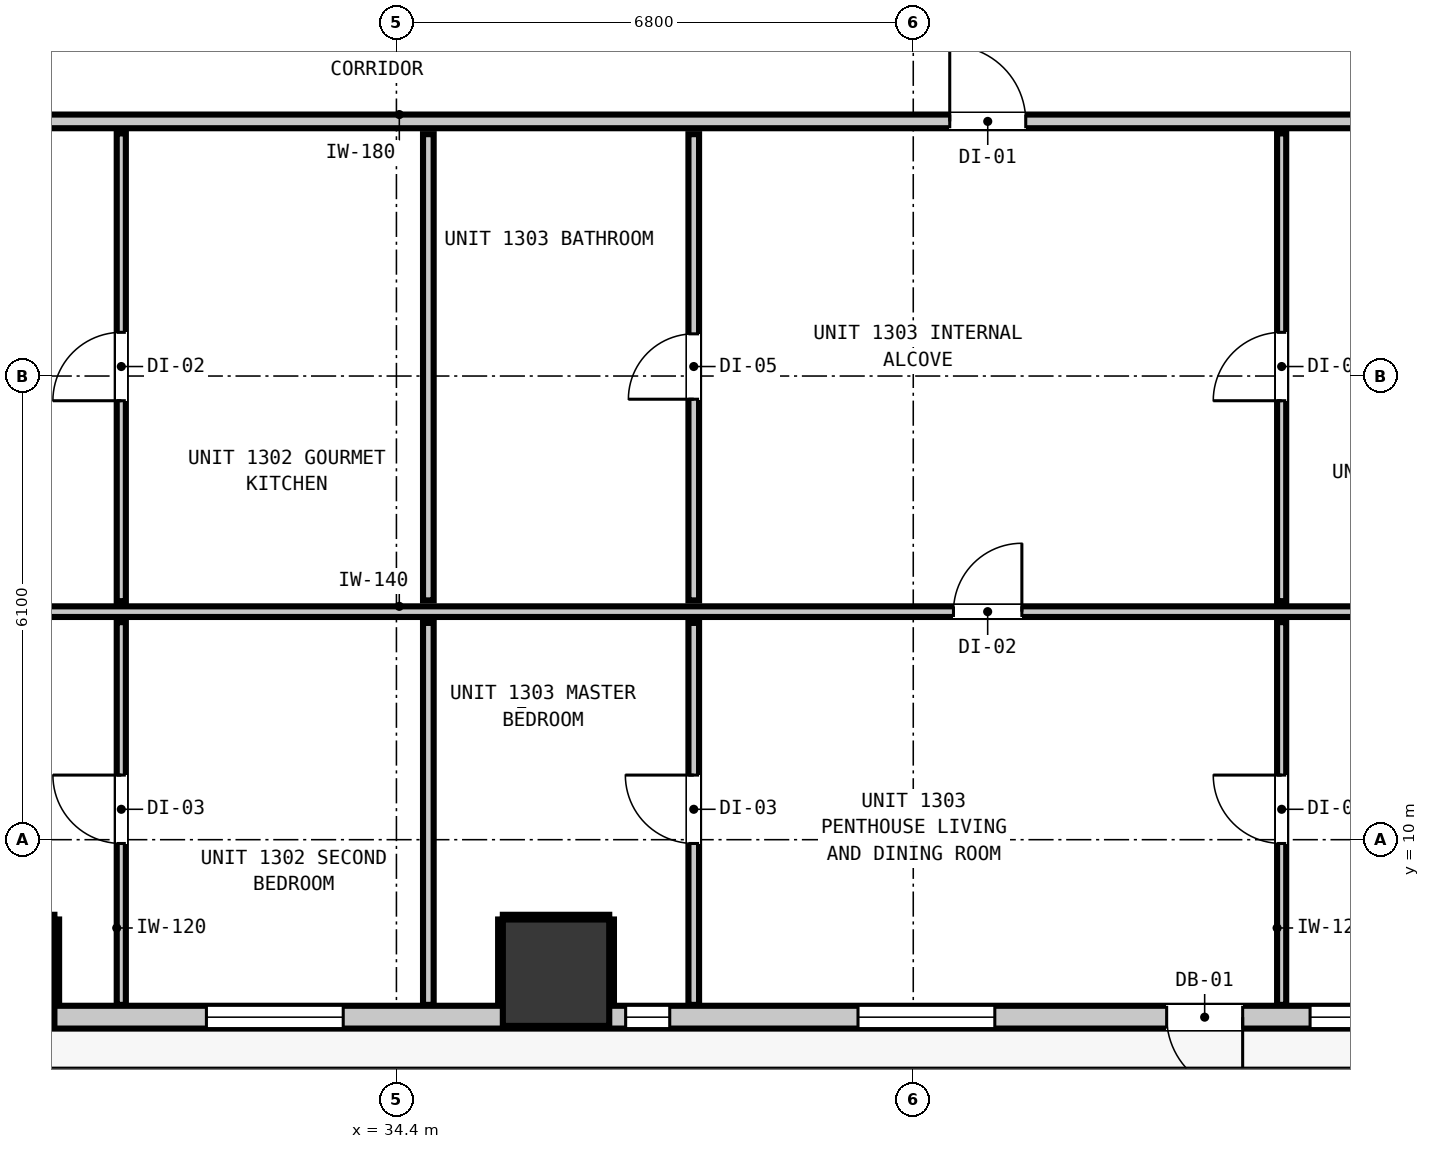
"""IFC4 building model, lengths in metres.
Left out: names, types, materials, properties, quantities, classifications, styles, units other than length and angle.
Written with IfcOpenShell. Run it as: python <this file> out.ifc"""

import sys

from ifc_helpers import new_model, si_unit, direction, frame, frame_2d, origin, origin_2d, place, context, subcontext, project, spatial, rectangle, extrude, element, fill, save


model = new_model("IFC4")
c1 = context("Model", 3, precision=1e-05, world=origin(), true_north=direction((0.0, 1.0)))
c2 = subcontext(c1, "Body", "Model", "MODEL_VIEW")
j1 = project(units=[si_unit("LENGTHUNIT", "METRE"), si_unit("PLANEANGLEUNIT", "RADIAN")], contexts=[c1])
p1 = place(None, origin())
s1 = spatial("IfcSite", under=j1, at=p1, CompositionType="ELEMENT")
p2 = place(p1, origin())
s2 = spatial("IfcBuilding", under=s1, at=p2, CompositionType="ELEMENT")
p3 = place(p2, frame((0.0, 0.0, 48.56)))
s3 = spatial("IfcBuildingStorey", under=s2, at=p3, CompositionType="ELEMENT", Elevation=48.56)
for number, where, z_axis, x_axis in (
    (1, (29.2, 8.25, 0.0), (0.0, 0.0, 1.0), (1.0, 0.0, 0.0)),
    (2, (36.5, 8.25, 0.0), (0.0, 0.0, 1.0), (1.0, 0.0, 0.0)),
):
    element("IfcColumn", number, at=place(p3, frame(where, z_axis=z_axis, x_axis=x_axis)), inside=s3, PredefinedType="COLUMN", context=c2, shape_type="SweptSolid", body=[
        extrude(rectangle(XDim=1.4, YDim=1.4, at=origin_2d()), origin(), (0.0, 0.0, 1.0), 3.32),
    ])
p4 = place(p3, frame((47.835, 7.665, 0.0), z_axis=(0.0, 0.0, 1.0), x_axis=(-1.0, 0.0, 0.0)))
e3 = element("IfcWall", 3, at=p4, inside=s3, PredefinedType="STANDARD", context=c2, shape_type="SweptSolid", body=[
    extrude(rectangle(XDim=37.47, YDim=0.3, at=frame_2d((18.735, 0.0))), origin(), (0.0, 0.0, 1.0), 3.06),
])
p5 = place(p4, frame((2.301, 0.0, 0.0)))
e4 = element("IfcOpeningElement", 4, at=p5, cuts=e3, PredefinedType="OPENING", context=c2, shape_type="SweptSolid", body=[
    extrude(rectangle(XDim=1.0, YDim=2.15, at=frame_2d((0.5, 1.075))), frame((0.0, 0.16, 0.0), z_axis=(0.0, -1.0, 0.0), x_axis=(1.0, 0.0, 0.0)), (0.0, 0.0, 1.0), 0.32),
])
p6 = place(p4, frame((32.251, 0.0, 0.85)))
e5 = element("IfcOpeningElement", 5, at=p6, cuts=e3, PredefinedType="OPENING", context=c2, shape_type="SweptSolid", body=[
    extrude(rectangle(XDim=1.05, YDim=1.65, at=frame_2d((0.525, 0.825))), frame((0.0, 0.16, 0.0), z_axis=(0.0, -1.0, 0.0), x_axis=(1.0, 0.0, 0.0)), (0.0, 0.0, 1.0), 0.32),
])
p7 = place(p4, frame((21.329, 0.0, 0.85)))
e6 = element("IfcOpeningElement", 6, at=p7, cuts=e3, PredefinedType="OPENING", context=c2, shape_type="SweptSolid", body=[
    extrude(rectangle(XDim=1.8, YDim=1.9, at=frame_2d((0.9, 0.95))), frame((0.0, 0.16, 0.0), z_axis=(0.0, -1.0, 0.0), x_axis=(1.0, 0.0, 0.0)), (0.0, 0.0, 1.0), 0.32),
])
p8 = place(p4, frame((25.539, 0.0, 0.85)))
e7 = element("IfcOpeningElement", 7, at=p8, cuts=e3, PredefinedType="OPENING", context=c2, shape_type="SweptSolid", body=[
    extrude(rectangle(XDim=0.58, YDim=1.5, at=frame_2d((0.29, 0.75))), frame((0.0, 0.16, 0.0), z_axis=(0.0, -1.0, 0.0), x_axis=(1.0, 0.0, 0.0)), (0.0, 0.0, 1.0), 0.32),
])
p9 = place(p4, frame((14.135, 0.0, 0.85)))
e8 = element("IfcOpeningElement", 8, at=p9, cuts=e3, PredefinedType="OPENING", context=c2, shape_type="SweptSolid", body=[
    extrude(rectangle(XDim=1.8, YDim=1.9, at=frame_2d((0.9, 0.95))), frame((0.0, 0.16, 0.0), z_axis=(0.0, -1.0, 0.0), x_axis=(1.0, 0.0, 0.0)), (0.0, 0.0, 1.0), 0.32),
])
p10 = place(p4, frame((5.562, 0.0, 0.85)))
e9 = element("IfcOpeningElement", 9, at=p10, cuts=e3, PredefinedType="OPENING", context=c2, shape_type="SweptSolid", body=[
    extrude(rectangle(XDim=1.8, YDim=1.9, at=frame_2d((0.9, 0.95))), frame((0.0, 0.16, 0.0), z_axis=(0.0, -1.0, 0.0), x_axis=(1.0, 0.0, 0.0)), (0.0, 0.0, 1.0), 0.32),
])
p11 = place(p4, frame((9.839, 0.0, 0.85)))
e10 = element("IfcOpeningElement", 10, at=p11, cuts=e3, PredefinedType="OPENING", context=c2, shape_type="SweptSolid", body=[
    extrude(rectangle(XDim=0.58, YDim=1.5, at=frame_2d((0.29, 0.75))), frame((0.0, 0.16, 0.0), z_axis=(0.0, -1.0, 0.0), x_axis=(1.0, 0.0, 0.0)), (0.0, 0.0, 1.0), 0.32),
])
p12 = place(p4, frame((0.364, 0.0, 0.85)))
e11 = element("IfcOpeningElement", 11, at=p12, cuts=e3, PredefinedType="OPENING", context=c2, shape_type="SweptSolid", body=[
    extrude(rectangle(XDim=1.05, YDim=1.65, at=frame_2d((0.525, 0.825))), frame((0.0, 0.16, 0.0), z_axis=(0.0, -1.0, 0.0), x_axis=(1.0, 0.0, 0.0)), (0.0, 0.0, 1.0), 0.32),
])
p13 = place(p3, frame((8.027, 19.45, 0.0), z_axis=(0.0, 0.0, 1.0), x_axis=(1.0, 0.0, 0.0)))
e12 = element("IfcWall", 12, at=p13, inside=s3, PredefinedType="PARTITIONING", context=c2, shape_type="SweptSolid", body=[
    extrude(rectangle(XDim=42.146, YDim=0.18, at=frame_2d((21.073, 0.0))), origin(), (0.0, 0.0, 1.0), 3.06),
])
p14 = place(p13, frame((5.256, 0.0, 0.0)))
e13 = element("IfcOpeningElement", 13, at=p14, cuts=e12, PredefinedType="OPENING", context=c2, shape_type="SweptSolid", body=[
    extrude(rectangle(XDim=1.0, YDim=2.15, at=frame_2d((0.5, 1.075))), frame((0.0, 0.1, 0.0), z_axis=(0.0, -1.0, 0.0), x_axis=(1.0, 0.0, 0.0)), (0.0, 0.0, 1.0), 0.2),
])
p15 = place(p13, frame((18.169, 0.0, 0.0)))
e14 = element("IfcOpeningElement", 14, at=p15, cuts=e12, PredefinedType="OPENING", context=c2, shape_type="SweptSolid", body=[
    extrude(rectangle(XDim=1.0, YDim=2.15, at=frame_2d((0.5, 1.075))), frame((0.0, 0.1, 0.0), z_axis=(0.0, -1.0, 0.0), x_axis=(1.0, 0.0, 0.0)), (0.0, 0.0, 1.0), 0.2),
])
p16 = place(p13, frame((33.653, 0.0, 0.0)))
e15 = element("IfcOpeningElement", 15, at=p16, cuts=e12, PredefinedType="OPENING", context=c2, shape_type="SweptSolid", body=[
    extrude(rectangle(XDim=1.0, YDim=2.15, at=frame_2d((0.5, 1.075))), frame((0.0, 0.1, 0.0), z_axis=(0.0, -1.0, 0.0), x_axis=(1.0, 0.0, 0.0)), (0.0, 0.0, 1.0), 0.2),
])
p17 = place(p3, frame((19.12, 13.0, 0.0), z_axis=(0.0, 0.0, 1.0), x_axis=(1.0, 0.0, 0.0)))
e16 = element("IfcWall", 16, at=p17, inside=s3, PredefinedType="PARTITIONING", context=c2, shape_type="SweptSolid", body=[
    extrude(rectangle(XDim=31.053, YDim=0.14, at=frame_2d((15.526, 0.0))), origin(), (0.0, 0.0, 1.0), 3.06),
])
p18 = place(p17, frame((7.126, 0.0, 0.0)))
e17 = element("IfcOpeningElement", 17, at=p18, cuts=e16, PredefinedType="OPENING", context=c2, shape_type="SweptSolid", body=[
    extrude(rectangle(XDim=0.9, YDim=2.1, at=frame_2d((0.45, 1.05))), frame((0.0, 0.08, 0.0), z_axis=(0.0, -1.0, 0.0), x_axis=(1.0, 0.0, 0.0)), (0.0, 0.0, 1.0), 0.16),
])
p19 = place(p17, frame((22.609, 0.0, 0.0)))
e18 = element("IfcOpeningElement", 18, at=p19, cuts=e16, PredefinedType="OPENING", context=c2, shape_type="SweptSolid", body=[
    extrude(rectangle(XDim=0.9, YDim=2.1, at=frame_2d((0.45, 1.05))), frame((0.0, 0.08, 0.0), z_axis=(0.0, -1.0, 0.0), x_axis=(1.0, 0.0, 0.0)), (0.0, 0.0, 1.0), 0.16),
])
p20 = place(p3, frame((34.82, 7.827, 0.0), z_axis=(0.0, 0.0, 1.0), x_axis=(0.0, 1.0, 0.0)))
e19 = element("IfcWall", 19, at=p20, inside=s3, PredefinedType="PARTITIONING", context=c2, shape_type="SweptSolid", body=[
    extrude(rectangle(XDim=5.025, YDim=0.14, at=frame_2d((2.513, 0.0))), origin(), (0.0, 0.0, 1.0), 3.06),
])
p21 = place(p3, frame((34.82, 13.148, 0.0), z_axis=(0.0, 0.0, 1.0), x_axis=(0.0, 1.0, 0.0)))
e20 = element("IfcWall", 20, at=p21, inside=s3, PredefinedType="PARTITIONING", context=c2, shape_type="SweptSolid", body=[
    extrude(rectangle(XDim=6.134, YDim=0.14, at=frame_2d((3.067, 0.0))), origin(), (0.0, 0.0, 1.0), 3.06),
])
p22 = place(p3, frame((38.312, 7.827, 0.0), z_axis=(0.0, 0.0, 1.0), x_axis=(0.0, 1.0, 0.0)))
e21 = element("IfcWall", 21, at=p22, inside=s3, PredefinedType="PARTITIONING", context=c2, shape_type="SweptSolid", body=[
    extrude(rectangle(XDim=5.025, YDim=0.14, at=frame_2d((2.513, 0.0))), origin(), (0.0, 0.0, 1.0), 3.06),
])
p23 = place(p22, frame((2.123, 0.0, 0.0)))
e22 = element("IfcOpeningElement", 22, at=p23, cuts=e21, PredefinedType="OPENING", context=c2, shape_type="SweptSolid", body=[
    extrude(rectangle(XDim=0.9, YDim=2.1, at=frame_2d((0.45, 1.05))), frame((0.0, 0.08, 0.0), z_axis=(0.0, -1.0, 0.0), x_axis=(1.0, 0.0, 0.0)), (0.0, 0.0, 1.0), 0.16),
])
p24 = place(p3, frame((38.312, 13.148, 0.0), z_axis=(0.0, 0.0, 1.0), x_axis=(0.0, 1.0, 0.0)))
e23 = element("IfcWall", 23, at=p24, inside=s3, PredefinedType="PARTITIONING", context=c2, shape_type="SweptSolid", body=[
    extrude(rectangle(XDim=6.134, YDim=0.14, at=frame_2d((3.067, 0.0))), origin(), (0.0, 0.0, 1.0), 3.06),
])
p25 = place(p24, frame((2.647, 0.0, 0.0)))
e24 = element("IfcOpeningElement", 24, at=p25, cuts=e23, PredefinedType="OPENING", context=c2, shape_type="SweptSolid", body=[
    extrude(rectangle(XDim=0.86, YDim=2.02, at=frame_2d((0.43, 1.01))), frame((0.0, 0.08, 0.0), z_axis=(0.0, -1.0, 0.0), x_axis=(1.0, 0.0, 0.0)), (0.0, 0.0, 1.0), 0.16),
])
p26 = place(p3, frame((30.78, 7.827, 0.0), z_axis=(0.0, 0.0, 1.0), x_axis=(0.0, 1.0, 0.0)))
e25 = element("IfcWall", 25, at=p26, inside=s3, PredefinedType="PARTITIONING", context=c2, shape_type="SweptSolid", body=[
    extrude(rectangle(XDim=5.035, YDim=0.12, at=frame_2d((2.518, 0.0))), origin(), (0.0, 0.0, 1.0), 3.06),
])
p27 = place(p26, frame((2.123, 0.0, 0.0)))
e26 = element("IfcOpeningElement", 26, at=p27, cuts=e25, PredefinedType="OPENING", context=c2, shape_type="SweptSolid", body=[
    extrude(rectangle(XDim=0.9, YDim=2.1, at=frame_2d((0.45, 1.05))), frame((0.0, 0.07, 0.0), z_axis=(0.0, -1.0, 0.0), x_axis=(1.0, 0.0, 0.0)), (0.0, 0.0, 1.0), 0.14),
])
p28 = place(p3, frame((30.78, 13.138, 0.0), z_axis=(0.0, 0.0, 1.0), x_axis=(0.0, 1.0, 0.0)))
e27 = element("IfcWall", 27, at=p28, inside=s3, PredefinedType="PARTITIONING", context=c2, shape_type="SweptSolid", body=[
    extrude(rectangle(XDim=6.154, YDim=0.12, at=frame_2d((3.077, 0.0))), origin(), (0.0, 0.0, 1.0), 3.06),
])
p29 = place(p28, frame((2.637, 0.0, 0.0)))
e28 = element("IfcOpeningElement", 28, at=p29, cuts=e27, PredefinedType="OPENING", context=c2, shape_type="SweptSolid", body=[
    extrude(rectangle(XDim=0.9, YDim=2.1, at=frame_2d((0.45, 1.05))), frame((0.0, 0.07, 0.0), z_axis=(0.0, -1.0, 0.0), x_axis=(1.0, 0.0, 0.0)), (0.0, 0.0, 1.0), 0.14),
])
p30 = place(p3, frame((46.047, 7.827, 0.0), z_axis=(0.0, 0.0, 1.0), x_axis=(0.0, 1.0, 0.0)))
e29 = element("IfcWall", 29, at=p30, inside=s3, PredefinedType="PARTITIONING", context=c2, shape_type="SweptSolid", body=[
    extrude(rectangle(XDim=5.035, YDim=0.12, at=frame_2d((2.518, 0.0))), origin(), (0.0, 0.0, 1.0), 3.06),
])
p31 = place(p30, frame((2.123, 0.0, 0.0)))
e30 = element("IfcOpeningElement", 30, at=p31, cuts=e29, PredefinedType="OPENING", context=c2, shape_type="SweptSolid", body=[
    extrude(rectangle(XDim=0.9, YDim=2.1, at=frame_2d((0.45, 1.05))), frame((0.0, 0.07, 0.0), z_axis=(0.0, -1.0, 0.0), x_axis=(1.0, 0.0, 0.0)), (0.0, 0.0, 1.0), 0.14),
])
p32 = place(p3, frame((46.047, 13.138, 0.0), z_axis=(0.0, 0.0, 1.0), x_axis=(0.0, 1.0, 0.0)))
e31 = element("IfcWall", 31, at=p32, inside=s3, PredefinedType="PARTITIONING", context=c2, shape_type="SweptSolid", body=[
    extrude(rectangle(XDim=6.154, YDim=0.12, at=frame_2d((3.077, 0.0))), origin(), (0.0, 0.0, 1.0), 3.06),
])
p33 = place(p32, frame((2.637, 0.0, 0.0)))
e32 = element("IfcOpeningElement", 32, at=p33, cuts=e31, PredefinedType="OPENING", context=c2, shape_type="SweptSolid", body=[
    extrude(rectangle(XDim=0.9, YDim=2.1, at=frame_2d((0.45, 1.05))), frame((0.0, 0.07, 0.0), z_axis=(0.0, -1.0, 0.0), x_axis=(1.0, 0.0, 0.0)), (0.0, 0.0, 1.0), 0.14),
])
p34 = place(p3, frame((28.5, 8.982, 0.0), z_axis=(0.0, 0.0, 1.0), x_axis=(1.0, 0.0, 0.0)))
e33 = element("IfcWall", 33, at=p34, inside=s3, PredefinedType="PARTITIONING", context=c2, shape_type="SweptSolid", body=[
    extrude(rectangle(XDim=1.4, YDim=0.06, at=frame_2d((0.7, 0.0))), origin(), (0.0, 0.0, 1.0), 1.45),
])
p35 = place(p3, frame((29.932, 7.83, 0.0), z_axis=(0.0, 0.0, 1.0), x_axis=(0.0, 1.0, 0.0)))
e34 = element("IfcWall", 34, at=p35, inside=s3, PredefinedType="PARTITIONING", context=c2, shape_type="SweptSolid", body=[
    extrude(rectangle(XDim=1.12, YDim=0.06, at=frame_2d((0.56, 0.0))), origin(), (0.0, 0.0, 1.0), 1.45),
])
p36 = place(p3, frame((35.8, 8.982, 0.0), z_axis=(0.0, 0.0, 1.0), x_axis=(1.0, 0.0, 0.0)))
e35 = element("IfcWall", 35, at=p36, inside=s3, PredefinedType="PARTITIONING", context=c2, shape_type="SweptSolid", body=[
    extrude(rectangle(XDim=1.4, YDim=0.06, at=frame_2d((0.7, 0.0))), origin(), (0.0, 0.0, 1.0), 1.45),
])
for number, where, z_axis, x_axis in (
    (36, (35.768, 7.83, 0.0), (0.0, 0.0, 1.0), (0.0, 1.0, 0.0)),
    (37, (37.232, 7.83, 0.0), (0.0, 0.0, 1.0), (0.0, 1.0, 0.0)),
):
    element("IfcWall", number, at=place(p3, frame(where, z_axis=z_axis, x_axis=x_axis)), inside=s3, PredefinedType="PARTITIONING", context=c2, shape_type="SweptSolid", body=[
        extrude(rectangle(XDim=1.12, YDim=0.06, at=frame_2d((0.56, 0.0))), origin(), (0.0, 0.0, 1.0), 1.45),
    ])
p37 = place(p5, origin())
e38 = element("IfcDoor", 38, at=p37, inside=s3, OperationType="SINGLE_SWING_LEFT", PredefinedType="DOOR", context=c2, shape_type="SweptSolid", body=[
    extrude(rectangle(XDim=1.0, YDim=2.15, at=frame_2d((0.5, 1.075))), frame((0.0, 0.025, 0.0), z_axis=(0.0, -1.0, 0.0), x_axis=(1.0, 0.0, 0.0)), (0.0, 0.0, 1.0), 0.05),
])
fill(e4, e38)
p38 = place(p9, origin())
e39 = element("IfcWindow", 39, at=p38, inside=s3, PartitioningType="SINGLE_PANEL", PredefinedType="WINDOW", context=c2, shape_type="SweptSolid", body=[
    extrude(rectangle(XDim=1.8, YDim=1.9, at=frame_2d((0.9, 0.95))), frame((0.0, 0.03, 0.0), z_axis=(0.0, -1.0, 0.0), x_axis=(1.0, 0.0, 0.0)), (0.0, 0.0, 1.0), 0.06),
])
fill(e8, e39)
p39 = place(p10, origin())
e40 = element("IfcWindow", 40, at=p39, inside=s3, PartitioningType="SINGLE_PANEL", PredefinedType="WINDOW", context=c2, shape_type="SweptSolid", body=[
    extrude(rectangle(XDim=1.8, YDim=1.9, at=frame_2d((0.9, 0.95))), frame((0.0, 0.03, 0.0), z_axis=(0.0, -1.0, 0.0), x_axis=(1.0, 0.0, 0.0)), (0.0, 0.0, 1.0), 0.06),
])
fill(e9, e40)
p40 = place(p11, origin())
e41 = element("IfcWindow", 41, at=p40, inside=s3, PartitioningType="SINGLE_PANEL", PredefinedType="WINDOW", context=c2, shape_type="SweptSolid", body=[
    extrude(rectangle(XDim=0.58, YDim=1.5, at=frame_2d((0.29, 0.75))), frame((0.0, 0.03, 0.0), z_axis=(0.0, -1.0, 0.0), x_axis=(1.0, 0.0, 0.0)), (0.0, 0.0, 1.0), 0.06),
])
fill(e10, e41)
p41 = place(p12, origin())
e42 = element("IfcWindow", 42, at=p41, inside=s3, PartitioningType="SINGLE_PANEL", PredefinedType="WINDOW", context=c2, shape_type="SweptSolid", body=[
    extrude(rectangle(XDim=1.05, YDim=1.65, at=frame_2d((0.525, 0.825))), frame((0.0, 0.03, 0.0), z_axis=(0.0, -1.0, 0.0), x_axis=(1.0, 0.0, 0.0)), (0.0, 0.0, 1.0), 0.06),
])
fill(e11, e42)
p42 = place(p29, origin())
e43 = element("IfcDoor", 43, at=p42, inside=s3, OperationType="SINGLE_SWING_LEFT", PredefinedType="DOOR", context=c2, shape_type="SweptSolid", body=[
    extrude(rectangle(XDim=0.9, YDim=2.1, at=frame_2d((0.45, 1.05))), frame((0.0, 0.025, 0.0), z_axis=(0.0, -1.0, 0.0), x_axis=(1.0, 0.0, 0.0)), (0.0, 0.0, 1.0), 0.05),
])
fill(e28, e43)
p43 = place(p27, origin())
e44 = element("IfcDoor", 44, at=p43, inside=s3, OperationType="SINGLE_SWING_RIGHT", PredefinedType="DOOR", context=c2, shape_type="SweptSolid", body=[
    extrude(rectangle(XDim=0.9, YDim=2.1, at=frame_2d((0.45, 1.05))), frame((0.0, 0.025, 0.0), z_axis=(0.0, -1.0, 0.0), x_axis=(1.0, 0.0, 0.0)), (0.0, 0.0, 1.0), 0.05),
])
fill(e26, e44)
p44 = place(p16, origin())
e45 = element("IfcDoor", 45, at=p44, inside=s3, OperationType="SINGLE_SWING_LEFT", PredefinedType="DOOR", context=c2, shape_type="SweptSolid", body=[
    extrude(rectangle(XDim=1.0, YDim=2.15, at=frame_2d((0.5, 1.075))), frame((0.0, 0.025, 0.0), z_axis=(0.0, -1.0, 0.0), x_axis=(1.0, 0.0, 0.0)), (0.0, 0.0, 1.0), 0.05),
])
fill(e15, e45)
p45 = place(p19, origin())
e46 = element("IfcDoor", 46, at=p45, inside=s3, OperationType="SINGLE_SWING_RIGHT", PredefinedType="DOOR", context=c2, shape_type="SweptSolid", body=[
    extrude(rectangle(XDim=0.9, YDim=2.1, at=frame_2d((0.45, 1.05))), frame((0.0, 0.025, 0.0), z_axis=(0.0, -1.0, 0.0), x_axis=(1.0, 0.0, 0.0)), (0.0, 0.0, 1.0), 0.05),
])
fill(e18, e46)
p46 = place(p25, origin())
e47 = element("IfcDoor", 47, at=p46, inside=s3, OperationType="SINGLE_SWING_LEFT", PredefinedType="DOOR", context=c2, shape_type="SweptSolid", body=[
    extrude(rectangle(XDim=0.86, YDim=2.02, at=frame_2d((0.43, 1.01))), frame((0.0, 0.025, 0.0), z_axis=(0.0, -1.0, 0.0), x_axis=(1.0, 0.0, 0.0)), (0.0, 0.0, 1.0), 0.05),
])
fill(e24, e47)
p47 = place(p23, origin())
e48 = element("IfcDoor", 48, at=p47, inside=s3, OperationType="SINGLE_SWING_RIGHT", PredefinedType="DOOR", context=c2, shape_type="SweptSolid", body=[
    extrude(rectangle(XDim=0.9, YDim=2.1, at=frame_2d((0.45, 1.05))), frame((0.0, 0.025, 0.0), z_axis=(0.0, -1.0, 0.0), x_axis=(1.0, 0.0, 0.0)), (0.0, 0.0, 1.0), 0.05),
])
fill(e22, e48)
p48 = place(p33, origin())
e49 = element("IfcDoor", 49, at=p48, inside=s3, OperationType="SINGLE_SWING_LEFT", PredefinedType="DOOR", context=c2, shape_type="SweptSolid", body=[
    extrude(rectangle(XDim=0.9, YDim=2.1, at=frame_2d((0.45, 1.05))), frame((0.0, 0.025, 0.0), z_axis=(0.0, -1.0, 0.0), x_axis=(1.0, 0.0, 0.0)), (0.0, 0.0, 1.0), 0.05),
])
fill(e32, e49)
p49 = place(p31, origin())
e50 = element("IfcDoor", 50, at=p49, inside=s3, OperationType="SINGLE_SWING_RIGHT", PredefinedType="DOOR", context=c2, shape_type="SweptSolid", body=[
    extrude(rectangle(XDim=0.9, YDim=2.1, at=frame_2d((0.45, 1.05))), frame((0.0, 0.025, 0.0), z_axis=(0.0, -1.0, 0.0), x_axis=(1.0, 0.0, 0.0)), (0.0, 0.0, 1.0), 0.05),
])
fill(e30, e50)
save(model, sys.argv[1])
